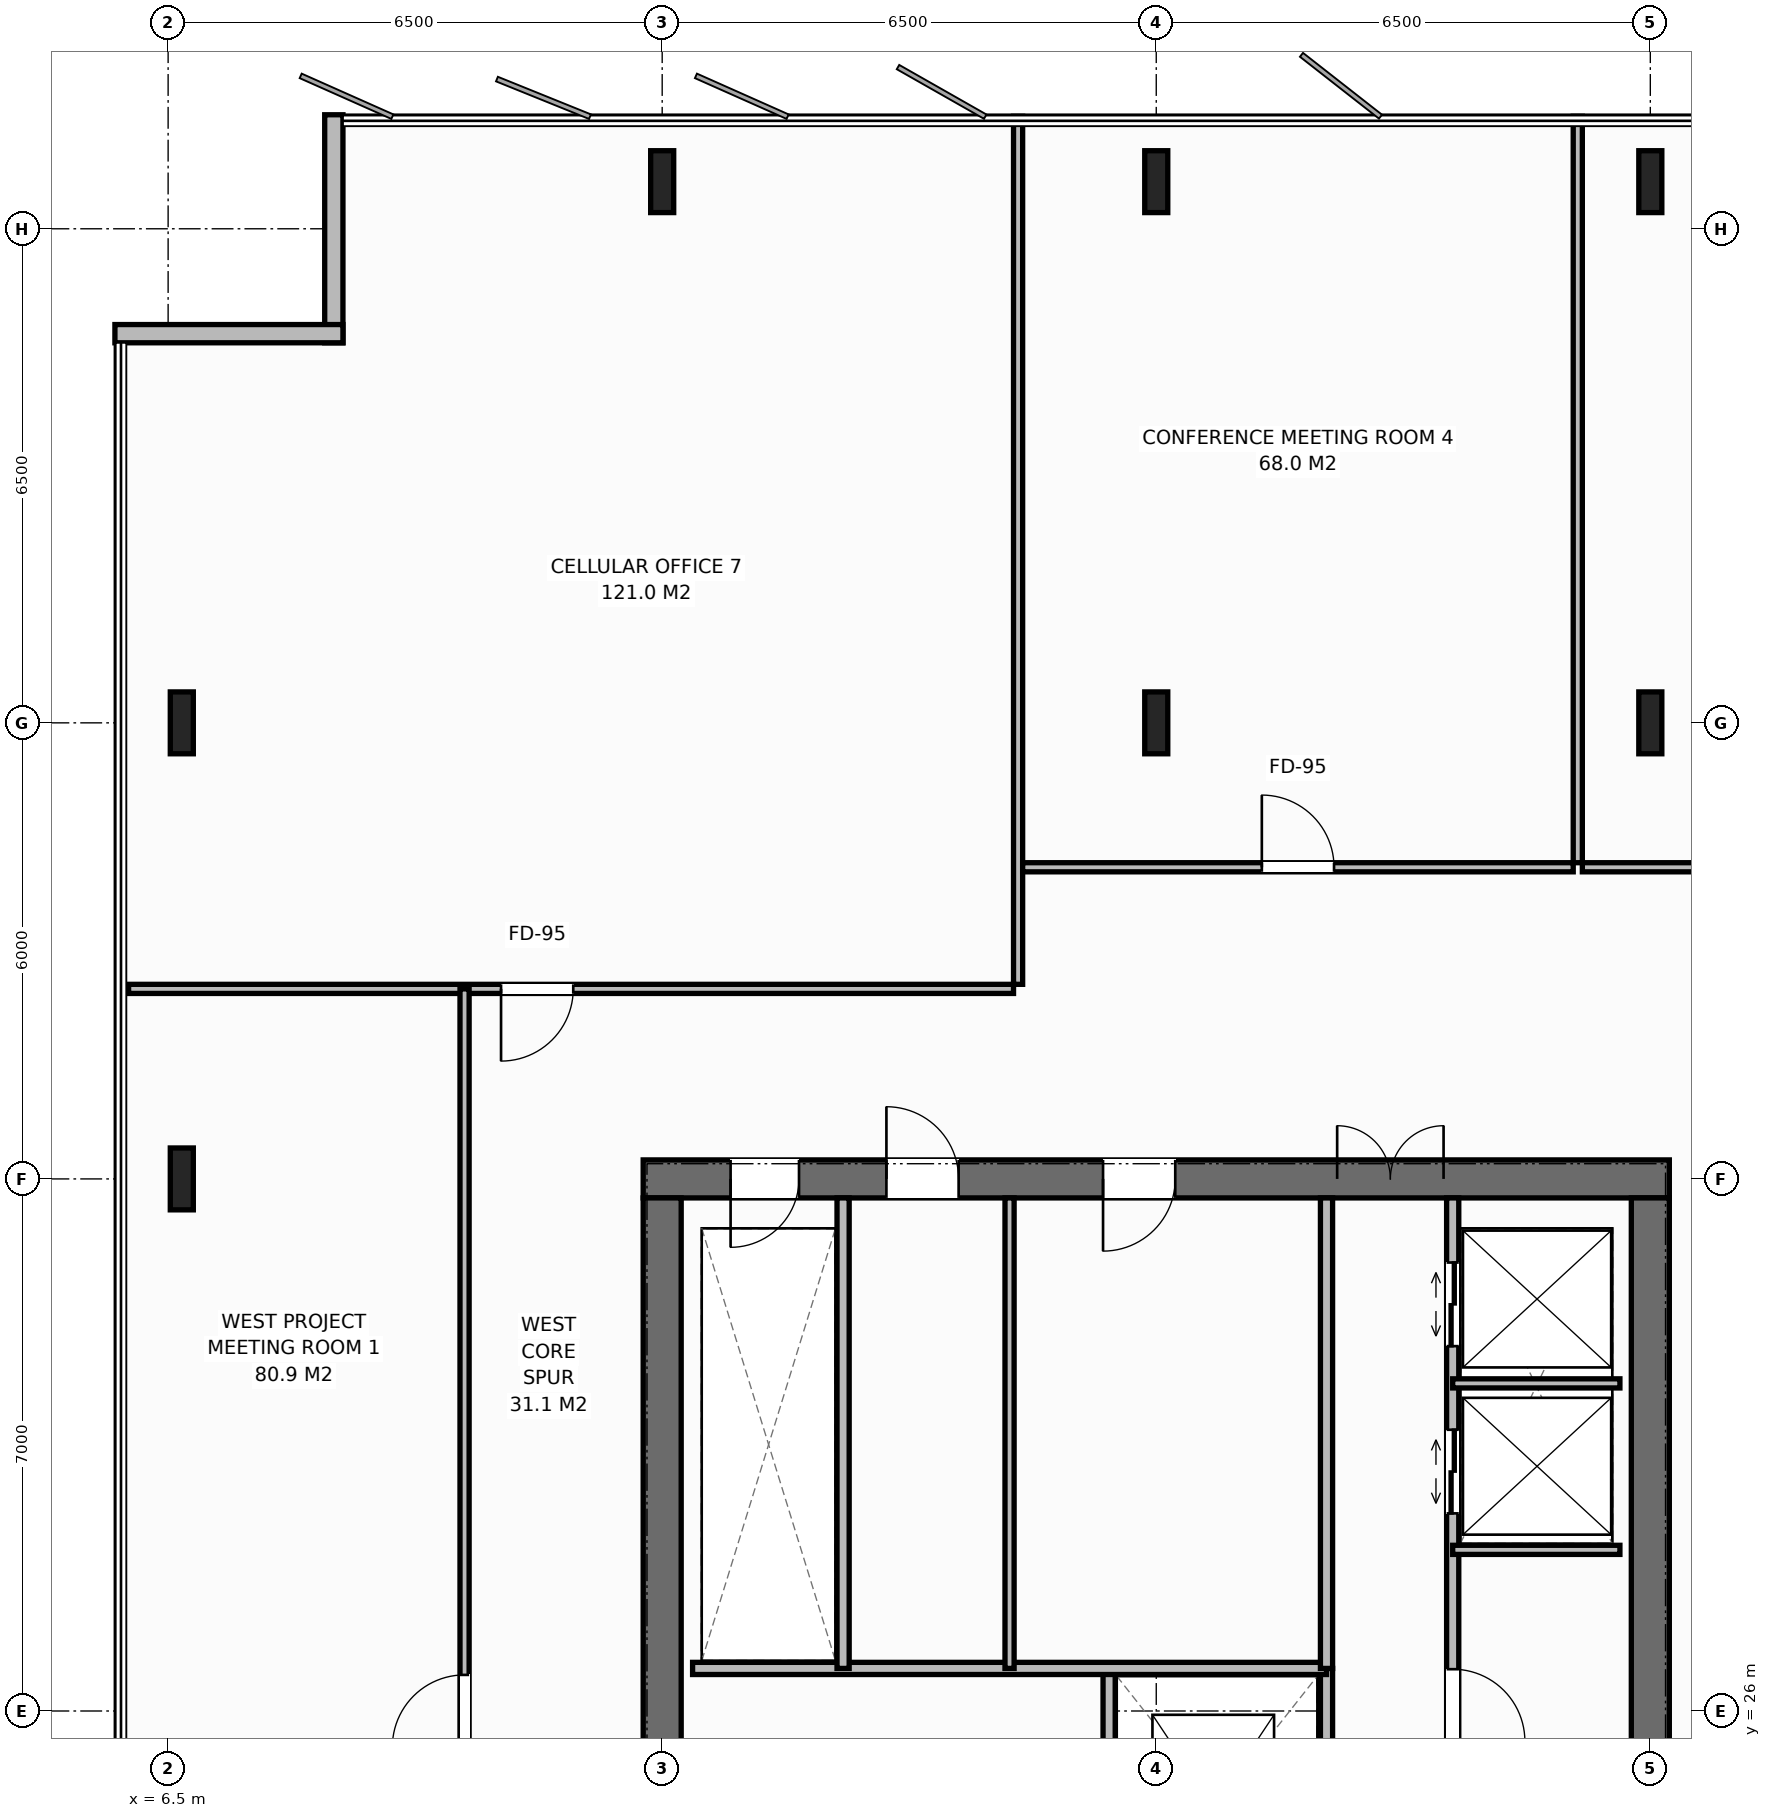
"""IFC4 building model, lengths in metres.
Left out: names, types, materials, properties, quantities, classifications, styles, units other than length and angle.
Written with IfcOpenShell. Run it as: python <this file> out.ifc"""

import sys

from ifc_helpers import new_model, si_unit, direction, frame, frame_2d, origin, origin_2d, place, context, subcontext, project, spatial, rectangle, i_section, extrude, element, fill, save


model = new_model("IFC4")
c1 = context("Model", 3, precision=1e-05, world=origin(), true_north=direction((0.0, 1.0)))
c2 = subcontext(c1, "Body", "Model", "MODEL_VIEW")
j1 = project(units=[si_unit("LENGTHUNIT", "METRE"), si_unit("PLANEANGLEUNIT", "RADIAN")], contexts=[c1])
p1 = place(None, origin())
s1 = spatial("IfcSite", under=j1, at=p1, CompositionType="ELEMENT")
p2 = place(p1, origin())
s2 = spatial("IfcBuilding", under=s1, at=p2, CompositionType="ELEMENT")
p3 = place(p2, frame((0.0, 0.0, 244.2)))
s3 = spatial("IfcBuildingStorey", under=s2, at=p3, CompositionType="ELEMENT", Elevation=244.2)
p4 = place(p3, frame((12.75, 33.0, 0.0), z_axis=(0.0, 0.0, 1.0), x_axis=(1.0, 0.0, 0.0)))
e1 = element("IfcWall", 1, at=p4, inside=s3, PredefinedType="SHEAR", context=c2, shape_type="SweptSolid", body=[
    extrude(rectangle(XDim=13.5, YDim=0.5, at=frame_2d((6.75, 0.0))), origin(), (0.0, 0.0, 1.0), 3.8),
])
p5 = place(p4, frame((1.15, 0.0, 0.0)))
e2 = element("IfcOpeningElement", 2, at=p5, cuts=e1, PredefinedType="OPENING", context=c2, shape_type="SweptSolid", body=[
    extrude(rectangle(XDim=0.9, YDim=2.15, at=frame_2d((0.45, 1.075))), frame((0.0, 0.26, 0.0), z_axis=(0.0, -1.0, 0.0), x_axis=(1.0, 0.0, 0.0)), (0.0, 0.0, 1.0), 0.52),
])
p6 = place(p4, frame((3.2, 0.0, 0.0)))
e3 = element("IfcOpeningElement", 3, at=p6, cuts=e1, PredefinedType="OPENING", context=c2, shape_type="SweptSolid", body=[
    extrude(rectangle(XDim=0.95, YDim=2.15, at=frame_2d((0.475, 1.075))), frame((0.0, 0.26, 0.0), z_axis=(0.0, -1.0, 0.0), x_axis=(1.0, 0.0, 0.0)), (0.0, 0.0, 1.0), 0.52),
])
p7 = place(p4, frame((6.05, 0.0, 0.0)))
e4 = element("IfcOpeningElement", 4, at=p7, cuts=e1, PredefinedType="OPENING", context=c2, shape_type="SweptSolid", body=[
    extrude(rectangle(XDim=0.95, YDim=2.15, at=frame_2d((0.475, 1.075))), frame((0.0, 0.26, 0.0), z_axis=(0.0, -1.0, 0.0), x_axis=(1.0, 0.0, 0.0)), (0.0, 0.0, 1.0), 0.52),
])
p8 = place(p4, frame((9.13, 0.0, 0.0)))
e5 = element("IfcOpeningElement", 5, at=p8, cuts=e1, PredefinedType="OPENING", context=c2, shape_type="SweptSolid", body=[
    extrude(rectangle(XDim=1.4, YDim=2.2, at=frame_2d((0.7, 1.1))), frame((0.0, 0.26, 0.0), z_axis=(0.0, -1.0, 0.0), x_axis=(1.0, 0.0, 0.0)), (0.0, 0.0, 1.0), 0.52),
])
p9 = place(p3, frame((13.0, 19.25, 0.0), z_axis=(0.0, 0.0, 1.0), x_axis=(0.0, 1.0, 0.0)))
e6 = element("IfcWall", 6, at=p9, inside=s3, PredefinedType="SHEAR", context=c2, shape_type="SweptSolid", body=[
    extrude(rectangle(XDim=13.5, YDim=0.5, at=frame_2d((6.75, 0.0))), origin(), (0.0, 0.0, 1.0), 3.8),
])
p10 = place(p9, frame((4.8, 0.0, 0.0)))
e7 = element("IfcOpeningElement", 7, at=p10, cuts=e6, PredefinedType="OPENING", context=c2, shape_type="SweptSolid", body=[
    extrude(rectangle(XDim=1.4, YDim=2.2, at=frame_2d((0.7, 1.1))), frame((0.0, 0.26, 0.0), z_axis=(0.0, -1.0, 0.0), x_axis=(1.0, 0.0, 0.0)), (0.0, 0.0, 1.0), 0.52),
])
p11 = place(p3, frame((26.0, 19.25, 0.0), z_axis=(0.0, 0.0, 1.0), x_axis=(0.0, 1.0, 0.0)))
e8 = element("IfcWall", 8, at=p11, inside=s3, PredefinedType="SHEAR", context=c2, shape_type="SweptSolid", body=[
    extrude(rectangle(XDim=13.5, YDim=0.5, at=frame_2d((6.75, 0.0))), origin(), (0.0, 0.0, 1.0), 3.8),
])
for number, where, z_axis, x_axis in (
    (9, (19.5, 39.0, 0.0), (0.0, 0.0, 1.0), (1.0, 0.0, 0.0)),
    (10, (26.0, 39.0, 0.0), (0.0, 0.0, 1.0), (1.0, 0.0, 0.0)),
    (11, (13.0, 46.12, 0.0), (0.0, 0.0, 1.0), (1.0, 0.0, 0.0)),
    (12, (19.5, 46.12, 0.0), (0.0, 0.0, 1.0), (1.0, 0.0, 0.0)),
    (13, (26.0, 46.12, 0.0), (0.0, 0.0, 1.0), (1.0, 0.0, 0.0)),
    (14, (6.68, 33.0, 0.0), (0.0, 0.0, 1.0), (1.0, 0.0, 0.0)),
    (15, (6.68, 39.0, 0.0), (0.0, 0.0, 1.0), (1.0, 0.0, 0.0)),
):
    element("IfcColumn", number, at=place(p3, frame(where, z_axis=z_axis, x_axis=x_axis)), inside=s3, PredefinedType="COLUMN", context=c2, shape_type="SweptSolid", body=[
        extrude(i_section(OverallWidth=0.303, OverallDepth=0.814, WebThickness=0.021, FlangeThickness=0.04, at=origin_2d()), origin(), (0.0, 0.0, 1.0), 3.8),
    ])
for number, where, z_axis, x_axis in (
    (16, (8.68, 44.0, 0.0), (0.0, 0.0, 1.0), (0.0, 1.0, 0.0)),
    (17, (5.8, 44.12, 0.0), (0.0, 0.0, 1.0), (1.0, 0.0, 0.0)),
):
    element("IfcWall", number, at=place(p3, frame(where, z_axis=z_axis, x_axis=x_axis)), inside=s3, PredefinedType="STANDARD", context=c2, shape_type="SweptSolid", body=[
        extrude(rectangle(XDim=3.0, YDim=0.24, at=frame_2d((1.5, 0.0))), origin(), (0.0, 0.0, 1.0), 3.58),
    ])
p12 = place(p3, frame((21.74, 23.09, 0.0), z_axis=(0.0, 0.0, 1.0), x_axis=(0.0, 1.0, 0.0)))
e18 = element("IfcWall", 18, at=p12, inside=s3, PredefinedType="STANDARD", context=c2, shape_type="SweptSolid", body=[
    extrude(rectangle(XDim=3.47, YDim=0.16, at=frame_2d((1.735, 0.0))), origin(), (0.0, 0.0, 1.0), 3.58),
])
p13 = place(p3, frame((18.88, 23.09, 0.0), z_axis=(0.0, 0.0, 1.0), x_axis=(0.0, 1.0, 0.0)))
e19 = element("IfcWall", 19, at=p13, inside=s3, PredefinedType="STANDARD", context=c2, shape_type="SweptSolid", body=[
    extrude(rectangle(XDim=3.47, YDim=0.16, at=frame_2d((1.735, 0.0))), origin(), (0.0, 0.0, 1.0), 3.58),
])
p14 = place(p13, frame((1.1, 0.0, 0.0)))
e20 = element("IfcOpeningElement", 20, at=p14, cuts=e19, PredefinedType="OPENING", context=c2, shape_type="SweptSolid", body=[
    extrude(rectangle(XDim=1.1, YDim=2.2, at=frame_2d((0.55, 1.1))), frame((0.0, 0.09, 0.0), z_axis=(0.0, -1.0, 0.0), x_axis=(1.0, 0.0, 0.0)), (0.0, 0.0, 1.0), 0.18),
])
p15 = place(p3, frame((13.4, 26.56, 0.0), z_axis=(0.0, 0.0, 1.0), x_axis=(1.0, 0.0, 0.0)))
e21 = element("IfcWall", 21, at=p15, inside=s3, PredefinedType="STANDARD", context=c2, shape_type="SweptSolid", body=[
    extrude(rectangle(XDim=8.34, YDim=0.16, at=frame_2d((4.17, 0.0))), origin(), (0.0, 0.0, 1.0), 3.58),
])
p16 = place(p3, frame((15.38, 26.56, 0.0), z_axis=(0.0, 0.0, 1.0), x_axis=(0.0, 1.0, 0.0)))
e22 = element("IfcWall", 22, at=p16, inside=s3, PredefinedType="STANDARD", context=c2, shape_type="SweptSolid", body=[
    extrude(rectangle(XDim=6.19, YDim=0.16, at=frame_2d((3.095, 0.0))), origin(), (0.0, 0.0, 1.0), 3.58),
])
p17 = place(p3, frame((17.57, 26.56, 0.0), z_axis=(0.0, 0.0, 1.0), x_axis=(0.0, 1.0, 0.0)))
e23 = element("IfcWall", 23, at=p17, inside=s3, PredefinedType="PARTITIONING", context=c2, shape_type="SweptSolid", body=[
    extrude(rectangle(XDim=6.19, YDim=0.12, at=frame_2d((3.095, 0.0))), origin(), (0.0, 0.0, 1.0), 3.58),
])
p18 = place(p3, frame((21.74, 26.56, 0.0), z_axis=(0.0, 0.0, 1.0), x_axis=(0.0, 1.0, 0.0)))
e24 = element("IfcWall", 24, at=p18, inside=s3, PredefinedType="STANDARD", context=c2, shape_type="SweptSolid", body=[
    extrude(rectangle(XDim=6.19, YDim=0.16, at=frame_2d((3.095, 0.0))), origin(), (0.0, 0.0, 1.0), 3.58),
])
p19 = place(p3, frame((23.4, 19.25, 0.0), z_axis=(0.0, 0.0, 1.0), x_axis=(0.0, 1.0, 0.0)))
e25 = element("IfcWall", 25, at=p19, inside=s3, PredefinedType="STANDARD", context=c2, shape_type="SweptSolid", body=[
    extrude(rectangle(XDim=13.5, YDim=0.16, at=frame_2d((6.75, 0.0))), origin(), (0.0, 0.0, 1.0), 3.58),
])
p20 = place(p19, frame((2.25, 0.0, 0.0)))
e26 = element("IfcOpeningElement", 26, at=p20, cuts=e25, PredefinedType="OPENING", context=c2, shape_type="SweptSolid", body=[
    extrude(rectangle(XDim=0.95, YDim=2.15, at=frame_2d((0.475, 1.075))), frame((0.0, 0.09, 0.0), z_axis=(0.0, -1.0, 0.0), x_axis=(1.0, 0.0, 0.0)), (0.0, 0.0, 1.0), 0.18),
])
p21 = place(p19, frame((6.35, 0.0, 0.0)))
e27 = element("IfcOpeningElement", 27, at=p21, cuts=e25, PredefinedType="OPENING", context=c2, shape_type="SweptSolid", body=[
    extrude(rectangle(XDim=0.95, YDim=2.15, at=frame_2d((0.475, 1.075))), frame((0.0, 0.09, 0.0), z_axis=(0.0, -1.0, 0.0), x_axis=(1.0, 0.0, 0.0)), (0.0, 0.0, 1.0), 0.18),
])
p22 = place(p19, frame((9.35, 0.0, 0.0)))
e28 = element("IfcOpeningElement", 28, at=p22, cuts=e25, PredefinedType="OPENING", context=c2, shape_type="SweptSolid", body=[
    extrude(rectangle(XDim=1.1, YDim=2.2, at=frame_2d((0.55, 1.1))), frame((0.0, 0.09, 0.0), z_axis=(0.0, -1.0, 0.0), x_axis=(1.0, 0.0, 0.0)), (0.0, 0.0, 1.0), 0.18),
])
p23 = place(p19, frame((11.55, 0.0, 0.0)))
e29 = element("IfcOpeningElement", 29, at=p23, cuts=e25, PredefinedType="OPENING", context=c2, shape_type="SweptSolid", body=[
    extrude(rectangle(XDim=1.1, YDim=2.2, at=frame_2d((0.55, 1.1))), frame((0.0, 0.09, 0.0), z_axis=(0.0, -1.0, 0.0), x_axis=(1.0, 0.0, 0.0)), (0.0, 0.0, 1.0), 0.18),
])
for number, where, z_axis, x_axis in (
    (30, (23.4, 28.12, 0.0), (0.0, 0.0, 1.0), (1.0, 0.0, 0.0)),
    (31, (23.4, 30.31, 0.0), (0.0, 0.0, 1.0), (1.0, 0.0, 0.0)),
):
    element("IfcWall", number, at=place(p3, frame(where, z_axis=z_axis, x_axis=x_axis)), inside=s3, PredefinedType="PARTITIONING", context=c2, shape_type="SweptSolid", body=[
        extrude(rectangle(XDim=2.2, YDim=0.12, at=frame_2d((1.1, 0.0))), origin(), (0.0, 0.0, 1.0), 3.58),
    ])
p24 = place(p3, frame((17.682, 35.56, 0.0), z_axis=(0.0, 0.0, 1.0), x_axis=(0.0, 1.0, 0.0)))
e32 = element("IfcWall", 32, at=p24, inside=s3, PredefinedType="PARTITIONING", context=c2, shape_type="SweptSolid", body=[
    extrude(rectangle(XDim=11.42, YDim=0.12, at=frame_2d((5.71, 0.0))), origin(), (0.0, 0.0, 1.0), 3.58),
])
p25 = place(p3, frame((5.98, 35.5, 0.0), z_axis=(0.0, 0.0, 1.0), x_axis=(1.0, 0.0, 0.0)))
e33 = element("IfcWall", 33, at=p25, inside=s3, PredefinedType="PARTITIONING", context=c2, shape_type="SweptSolid", body=[
    extrude(rectangle(XDim=11.642, YDim=0.12, at=frame_2d((5.821, 0.0))), origin(), (0.0, 0.0, 1.0), 3.58),
])
p26 = place(p25, frame((4.9, 0.0, 0.0)))
e34 = element("IfcOpeningElement", 34, at=p26, cuts=e33, PredefinedType="OPENING", context=c2, shape_type="SweptSolid", body=[
    extrude(rectangle(XDim=0.95, YDim=2.15, at=frame_2d((0.475, 1.075))), frame((0.0, 0.07, 0.0), z_axis=(0.0, -1.0, 0.0), x_axis=(1.0, 0.0, 0.0)), (0.0, 0.0, 1.0), 0.14),
])
p27 = place(p3, frame((25.046, 37.16, 0.0), z_axis=(0.0, 0.0, 1.0), x_axis=(0.0, 1.0, 0.0)))
e35 = element("IfcWall", 35, at=p27, inside=s3, PredefinedType="PARTITIONING", context=c2, shape_type="SweptSolid", body=[
    extrude(rectangle(XDim=9.82, YDim=0.12, at=frame_2d((4.91, 0.0))), origin(), (0.0, 0.0, 1.0), 3.58),
])
p28 = place(p3, frame((17.742, 37.1, 0.0), z_axis=(0.0, 0.0, 1.0), x_axis=(1.0, 0.0, 0.0)))
e36 = element("IfcWall", 36, at=p28, inside=s3, PredefinedType="PARTITIONING", context=c2, shape_type="SweptSolid", body=[
    extrude(rectangle(XDim=7.243, YDim=0.12, at=frame_2d((3.622, 0.0))), origin(), (0.0, 0.0, 1.0), 3.58),
])
p29 = place(p28, frame((3.147, 0.0, 0.0)))
e37 = element("IfcOpeningElement", 37, at=p29, cuts=e36, PredefinedType="OPENING", context=c2, shape_type="SweptSolid", body=[
    extrude(rectangle(XDim=0.95, YDim=2.15, at=frame_2d((0.475, 1.075))), frame((0.0, 0.07, 0.0), z_axis=(0.0, -1.0, 0.0), x_axis=(1.0, 0.0, 0.0)), (0.0, 0.0, 1.0), 0.14),
])
p30 = place(p3, frame((25.106, 37.1, 0.0), z_axis=(0.0, 0.0, 1.0), x_axis=(1.0, 0.0, 0.0)))
e38 = element("IfcWall", 38, at=p30, inside=s3, PredefinedType="PARTITIONING", context=c2, shape_type="SweptSolid", body=[
    extrude(rectangle(XDim=12.19, YDim=0.12, at=frame_2d((6.095, 0.0))), origin(), (0.0, 0.0, 1.0), 3.58),
])
p31 = place(p30, frame((10.76, 0.0, 0.0)))
e39 = element("IfcOpeningElement", 39, at=p31, cuts=e38, PredefinedType="OPENING", context=c2, shape_type="SweptSolid", body=[
    extrude(rectangle(XDim=0.95, YDim=2.15, at=frame_2d((0.475, 1.075))), frame((0.0, 0.07, 0.0), z_axis=(0.0, -1.0, 0.0), x_axis=(1.0, 0.0, 0.0)), (0.0, 0.0, 1.0), 0.14),
])
p32 = place(p3, frame((10.4, 16.5, 0.0), z_axis=(0.0, 0.0, 1.0), x_axis=(0.0, 1.0, 0.0)))
e40 = element("IfcWall", 40, at=p32, inside=s3, PredefinedType="PARTITIONING", context=c2, shape_type="SweptSolid", body=[
    extrude(rectangle(XDim=19.0, YDim=0.12, at=frame_2d((9.5, 0.0))), origin(), (0.0, 0.0, 1.0), 3.58),
])
p33 = place(p32, frame((9.025, 0.0, 0.0)))
e41 = element("IfcOpeningElement", 41, at=p33, cuts=e40, PredefinedType="OPENING", context=c2, shape_type="SweptSolid", body=[
    extrude(rectangle(XDim=0.95, YDim=2.15, at=frame_2d((0.475, 1.075))), frame((0.0, 0.07, 0.0), z_axis=(0.0, -1.0, 0.0), x_axis=(1.0, 0.0, 0.0)), (0.0, 0.0, 1.0), 0.14),
])
p34 = place(p5, origin())
e42 = element("IfcDoor", 42, at=p34, inside=s3, OperationType="SINGLE_SWING_RIGHT", PredefinedType="DOOR", context=c2, shape_type="SweptSolid", body=[
    extrude(rectangle(XDim=0.9, YDim=2.15, at=frame_2d((0.45, 1.075))), frame((0.0, -0.025, 0.0), z_axis=(0.0, -1.0, 0.0), x_axis=(1.0, 0.0, 0.0)), (0.0, 0.0, 1.0), 0.05),
])
fill(e2, e42)
p35 = place(p6, origin())
e43 = element("IfcDoor", 43, at=p35, inside=s3, OperationType="SINGLE_SWING_LEFT", PredefinedType="DOOR", context=c2, shape_type="SweptSolid", body=[
    extrude(rectangle(XDim=0.95, YDim=2.15, at=frame_2d((0.475, 1.075))), frame((0.0, -0.025, 0.0), z_axis=(0.0, -1.0, 0.0), x_axis=(1.0, 0.0, 0.0)), (0.0, 0.0, 1.0), 0.05),
])
fill(e3, e43)
p36 = place(p7, origin())
e44 = element("IfcDoor", 44, at=p36, inside=s3, OperationType="SINGLE_SWING_RIGHT", PredefinedType="DOOR", context=c2, shape_type="SweptSolid", body=[
    extrude(rectangle(XDim=0.95, YDim=2.15, at=frame_2d((0.475, 1.075))), frame((0.0, -0.025, 0.0), z_axis=(0.0, -1.0, 0.0), x_axis=(1.0, 0.0, 0.0)), (0.0, 0.0, 1.0), 0.05),
])
fill(e4, e44)
p37 = place(p8, origin())
e45 = element("IfcDoor", 45, at=p37, inside=s3, OperationType="DOUBLE_DOOR_SINGLE_SWING", PredefinedType="DOOR", context=c2, shape_type="SweptSolid", body=[
    extrude(rectangle(XDim=1.4, YDim=2.2, at=frame_2d((0.7, 1.1))), frame((0.0, -0.025, 0.0), z_axis=(0.0, -1.0, 0.0), x_axis=(1.0, 0.0, 0.0)), (0.0, 0.0, 1.0), 0.05),
])
fill(e5, e45)
p38 = place(p21, origin())
e46 = element("IfcDoor", 46, at=p38, inside=s3, OperationType="SINGLE_SWING_RIGHT", PredefinedType="DOOR", context=c2, shape_type="SweptSolid", body=[
    extrude(rectangle(XDim=0.95, YDim=2.15, at=frame_2d((0.475, 1.075))), frame((0.0, 0.025, 0.0), z_axis=(0.0, -1.0, 0.0), x_axis=(1.0, 0.0, 0.0)), (0.0, 0.0, 1.0), 0.05),
])
fill(e27, e46)
p39 = place(p22, origin())
e47 = element("IfcDoor", 47, at=p39, inside=s3, OperationType="DOUBLE_DOOR_SLIDING", PredefinedType="DOOR", context=c2, shape_type="SweptSolid", body=[
    extrude(rectangle(XDim=1.1, YDim=2.2, at=frame_2d((0.55, 1.1))), frame((0.0, 0.025, 0.0), z_axis=(0.0, -1.0, 0.0), x_axis=(1.0, 0.0, 0.0)), (0.0, 0.0, 1.0), 0.05),
])
fill(e28, e47)
p40 = place(p23, origin())
e48 = element("IfcDoor", 48, at=p40, inside=s3, OperationType="DOUBLE_DOOR_SLIDING", PredefinedType="DOOR", context=c2, shape_type="SweptSolid", body=[
    extrude(rectangle(XDim=1.1, YDim=2.2, at=frame_2d((0.55, 1.1))), frame((0.0, 0.025, 0.0), z_axis=(0.0, -1.0, 0.0), x_axis=(1.0, 0.0, 0.0)), (0.0, 0.0, 1.0), 0.05),
])
fill(e29, e48)
p41 = place(p26, origin())
e49 = element("IfcDoor", 49, at=p41, inside=s3, OperationType="SINGLE_SWING_RIGHT", PredefinedType="DOOR", context=c2, shape_type="SweptSolid", body=[
    extrude(rectangle(XDim=0.95, YDim=2.15, at=frame_2d((0.475, 1.075))), frame((0.0, 0.025, 0.0), z_axis=(0.0, -1.0, 0.0), x_axis=(1.0, 0.0, 0.0)), (0.0, 0.0, 1.0), 0.05),
])
fill(e34, e49)
p42 = place(p29, origin())
e50 = element("IfcDoor", 50, at=p42, inside=s3, OperationType="SINGLE_SWING_LEFT", PredefinedType="DOOR", context=c2, shape_type="SweptSolid", body=[
    extrude(rectangle(XDim=0.95, YDim=2.15, at=frame_2d((0.475, 1.075))), frame((0.0, 0.025, 0.0), z_axis=(0.0, -1.0, 0.0), x_axis=(1.0, 0.0, 0.0)), (0.0, 0.0, 1.0), 0.05),
])
fill(e37, e50)
p43 = place(p33, origin())
e51 = element("IfcDoor", 51, at=p43, inside=s3, OperationType="SINGLE_SWING_LEFT", PredefinedType="DOOR", context=c2, shape_type="SweptSolid", body=[
    extrude(rectangle(XDim=0.95, YDim=2.15, at=frame_2d((0.475, 1.075))), frame((0.0, 0.025, 0.0), z_axis=(0.0, -1.0, 0.0), x_axis=(1.0, 0.0, 0.0)), (0.0, 0.0, 1.0), 0.05),
])
fill(e41, e51)
save(model, sys.argv[1])
